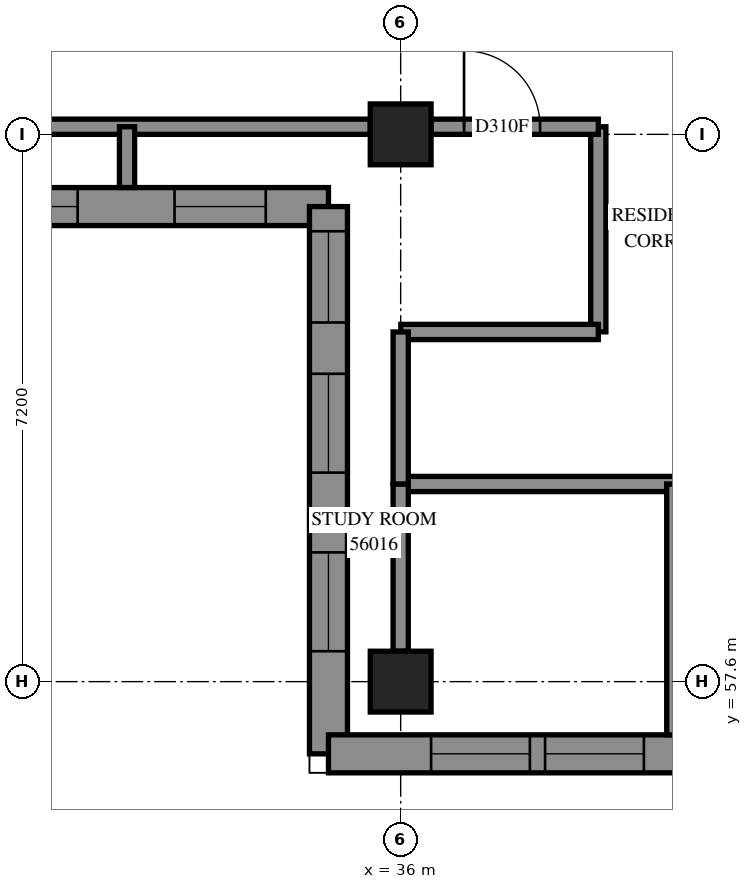
"""IFC4 building model, lengths in metres.
Left out: names, types, materials, properties, quantities, classifications, styles, units other than length and angle.
Written with IfcOpenShell. Run it as: python <this file> out.ifc"""

import sys

from ifc_helpers import new_model, si_unit, direction, frame, frame_2d, origin, origin_2d, place, context, subcontext, project, spatial, polyline, rectangle, outline, extrude, element, fill, save


model = new_model("IFC4")
c1 = context("Model", 3, precision=1e-05, world=origin(), true_north=direction((0.0, 1.0)))
c2 = subcontext(c1, "Body", "Model", "MODEL_VIEW")
j1 = project(units=[si_unit("LENGTHUNIT", "METRE"), si_unit("PLANEANGLEUNIT", "RADIAN")], contexts=[c1])
p1 = place(None, origin())
s1 = spatial("IfcSite", under=j1, at=p1, CompositionType="ELEMENT")
p2 = place(p1, origin())
s2 = spatial("IfcBuilding", under=s1, at=p2, CompositionType="ELEMENT")
p3 = place(p2, frame((0.0, 0.0, 206.6)))
s3 = spatial("IfcBuildingStorey", under=s2, at=p3, CompositionType="ELEMENT", Elevation=206.6)
for number, where, z_axis, x_axis in (
    (1, (36.0, 57.6, 0.0), (0.0, 0.0, 1.0), (1.0, 0.0, 0.0)),
    (2, (36.0, 64.8, 0.0), (0.0, 0.0, 1.0), (1.0, 0.0, 0.0)),
):
    element("IfcColumn", number, at=place(p3, frame(where, z_axis=z_axis, x_axis=x_axis)), inside=s3, PredefinedType="COLUMN", context=c2, shape_type="SweptSolid", body=[
        extrude(rectangle(XDim=0.8, YDim=0.8, at=origin_2d()), origin(), (0.0, 0.0, 1.0), 3.1),
    ])
p4 = place(p3, frame((26.799, 63.85, 0.0), z_axis=(0.0, 0.0, 1.0), x_axis=(1.0, 0.0, 0.0)))
e3 = element("IfcWall", 3, at=p4, inside=s3, PredefinedType="SOLIDWALL", context=c2, shape_type="SweptSolid", body=[
    extrude(outline(polyline([(-0.25, -0.25), (8.001, -0.25), (8.501, 0.25), (0.25, 0.25), (-0.25, -0.25)])), origin(), (0.0, 0.0, 1.0), 3.1),
])
p5 = place(p4, frame((2.151, 0.0, 0.45)))
e4 = element("IfcOpeningElement", 4, at=p5, cuts=e3, PredefinedType="OPENING", context=c2, shape_type="SweptSolid", body=[
    extrude(rectangle(XDim=1.3, YDim=2.5, at=frame_2d((0.65, 1.25))), frame((0.0, 0.26, 0.0), z_axis=(0.0, -1.0, 0.0), x_axis=(1.0, 0.0, 0.0)), (0.0, 0.0, 1.0), 0.52),
])
p6 = place(p4, frame((3.651, 0.0, 0.45)))
e5 = element("IfcOpeningElement", 5, at=p6, cuts=e3, PredefinedType="OPENING", context=c2, shape_type="SweptSolid", body=[
    extrude(rectangle(XDim=1.3, YDim=2.5, at=frame_2d((0.65, 1.25))), frame((0.0, 0.26, 0.0), z_axis=(0.0, -1.0, 0.0), x_axis=(1.0, 0.0, 0.0)), (0.0, 0.0, 1.0), 0.52),
])
p7 = place(p4, frame((0.625, 0.0, 0.45)))
e6 = element("IfcOpeningElement", 6, at=p7, cuts=e3, PredefinedType="OPENING", context=c2, shape_type="SweptSolid", body=[
    extrude(rectangle(XDim=1.2, YDim=2.5, at=frame_2d((0.6, 1.25))), frame((0.0, 0.26, 0.0), z_axis=(0.0, -1.0, 0.0), x_axis=(1.0, 0.0, 0.0)), (0.0, 0.0, 1.0), 0.52),
])
p8 = place(p4, frame((6.226, 0.0, 0.45)))
e7 = element("IfcOpeningElement", 7, at=p8, cuts=e3, PredefinedType="OPENING", context=c2, shape_type="SweptSolid", body=[
    extrude(rectangle(XDim=1.2, YDim=2.5, at=frame_2d((0.6, 1.25))), frame((0.0, 0.26, 0.0), z_axis=(0.0, -1.0, 0.0), x_axis=(1.0, 0.0, 0.0)), (0.0, 0.0, 1.0), 0.52),
])
p9 = place(p3, frame((35.05, 63.85, 0.0), z_axis=(0.0, 0.0, 1.0), x_axis=(0.0, -1.0, 0.0)))
e8 = element("IfcWall", 8, at=p9, inside=s3, PredefinedType="SOLIDWALL", context=c2, shape_type="SweptSolid", body=[
    extrude(outline(polyline([(0.25, -0.25), (7.45, -0.25), (6.95, 0.25), (-0.25, 0.25), (0.25, -0.25)])), origin(), (0.0, 0.0, 1.0), 3.1),
])
p10 = place(p9, frame((2.2, 0.0, 0.45)))
e9 = element("IfcOpeningElement", 9, at=p10, cuts=e8, PredefinedType="OPENING", context=c2, shape_type="SweptSolid", body=[
    extrude(rectangle(XDim=1.3, YDim=2.5, at=frame_2d((0.65, 1.25))), frame((0.0, 0.26, 0.0), z_axis=(0.0, -1.0, 0.0), x_axis=(1.0, 0.0, 0.0)), (0.0, 0.0, 1.0), 0.52),
])
p11 = place(p9, frame((4.55, 0.0, 0.45)))
e10 = element("IfcOpeningElement", 10, at=p11, cuts=e8, PredefinedType="OPENING", context=c2, shape_type="SweptSolid", body=[
    extrude(rectangle(XDim=1.3, YDim=2.5, at=frame_2d((0.65, 1.25))), frame((0.0, 0.26, 0.0), z_axis=(0.0, -1.0, 0.0), x_axis=(1.0, 0.0, 0.0)), (0.0, 0.0, 1.0), 0.52),
])
p12 = place(p9, frame((0.325, 0.0, 0.45)))
e11 = element("IfcOpeningElement", 11, at=p12, cuts=e8, PredefinedType="OPENING", context=c2, shape_type="SweptSolid", body=[
    extrude(rectangle(XDim=1.2, YDim=2.5, at=frame_2d((0.6, 1.25))), frame((0.0, 0.26, 0.0), z_axis=(0.0, -1.0, 0.0), x_axis=(1.0, 0.0, 0.0)), (0.0, 0.0, 1.0), 0.52),
])
p13 = place(p3, frame((35.05, 56.65, 0.0), z_axis=(0.0, 0.0, 1.0), x_axis=(1.0, 0.0, 0.0)))
e12 = element("IfcWall", 12, at=p13, inside=s3, PredefinedType="SOLIDWALL", context=c2, shape_type="SweptSolid", body=[
    extrude(outline(polyline([(-0.25, -0.25), (6.95, -0.25), (7.45, 0.25), (0.25, 0.25), (-0.25, -0.25)])), origin(), (0.0, 0.0, 1.0), 3.1),
])
p14 = place(p13, frame((1.35, 0.0, 0.45)))
e13 = element("IfcOpeningElement", 13, at=p14, cuts=e12, PredefinedType="OPENING", context=c2, shape_type="SweptSolid", body=[
    extrude(rectangle(XDim=1.3, YDim=2.5, at=frame_2d((0.65, 1.25))), frame((0.0, 0.26, 0.0), z_axis=(0.0, -1.0, 0.0), x_axis=(1.0, 0.0, 0.0)), (0.0, 0.0, 1.0), 0.52),
])
p15 = place(p13, frame((2.85, 0.0, 0.45)))
e14 = element("IfcOpeningElement", 14, at=p15, cuts=e12, PredefinedType="OPENING", context=c2, shape_type="SweptSolid", body=[
    extrude(rectangle(XDim=1.3, YDim=2.5, at=frame_2d((0.65, 1.25))), frame((0.0, 0.26, 0.0), z_axis=(0.0, -1.0, 0.0), x_axis=(1.0, 0.0, 0.0)), (0.0, 0.0, 1.0), 0.52),
])
p16 = place(p13, frame((5.175, 0.0, 0.45)))
e15 = element("IfcOpeningElement", 15, at=p16, cuts=e12, PredefinedType="OPENING", context=c2, shape_type="SweptSolid", body=[
    extrude(rectangle(XDim=1.2, YDim=2.5, at=frame_2d((0.6, 1.25))), frame((0.0, 0.26, 0.0), z_axis=(0.0, -1.0, 0.0), x_axis=(1.0, 0.0, 0.0)), (0.0, 0.0, 1.0), 0.52),
])
p17 = place(p3, frame((36.0, 60.2, 0.0), z_axis=(0.0, 0.0, 1.0), x_axis=(1.0, 0.0, 0.0)))
e16 = element("IfcWall", 16, at=p17, inside=s3, PredefinedType="PARTITIONING", context=c2, shape_type="SweptSolid", body=[
    extrude(rectangle(XDim=17.0, YDim=0.2, at=frame_2d((8.5, 0.0))), origin(), (0.0, 0.0, 1.0), 3.1),
])
p18 = place(p17, frame((4.125, 0.0, 0.0)))
e17 = element("IfcOpeningElement", 17, at=p18, cuts=e16, PredefinedType="OPENING", context=c2, shape_type="SweptSolid", body=[
    extrude(rectangle(XDim=1.0, YDim=2.1, at=frame_2d((0.5, 1.05))), frame((0.0, 0.11, 0.0), z_axis=(0.0, -1.0, 0.0), x_axis=(1.0, 0.0, 0.0)), (0.0, 0.0, 1.0), 0.22),
])
p19 = place(p17, frame((7.6, 0.0, 0.0)))
e18 = element("IfcOpeningElement", 18, at=p19, cuts=e16, PredefinedType="OPENING", context=c2, shape_type="SweptSolid", body=[
    extrude(rectangle(XDim=0.9, YDim=2.1, at=frame_2d((0.45, 1.05))), frame((0.0, 0.11, 0.0), z_axis=(0.0, -1.0, 0.0), x_axis=(1.0, 0.0, 0.0)), (0.0, 0.0, 1.0), 0.22),
])
p20 = place(p17, frame((11.48, 0.0, 0.0)))
e19 = element("IfcOpeningElement", 19, at=p20, cuts=e16, PredefinedType="OPENING", context=c2, shape_type="SweptSolid", body=[
    extrude(rectangle(XDim=1.0, YDim=2.1, at=frame_2d((0.5, 1.05))), frame((0.0, 0.11, 0.0), z_axis=(0.0, -1.0, 0.0), x_axis=(1.0, 0.0, 0.0)), (0.0, 0.0, 1.0), 0.22),
])
p21 = place(p17, frame((15.805, 0.0, 0.0)))
e20 = element("IfcOpeningElement", 20, at=p21, cuts=e16, PredefinedType="OPENING", context=c2, shape_type="SweptSolid", body=[
    extrude(rectangle(XDim=1.0, YDim=2.1, at=frame_2d((0.5, 1.05))), frame((0.0, 0.11, 0.0), z_axis=(0.0, -1.0, 0.0), x_axis=(1.0, 0.0, 0.0)), (0.0, 0.0, 1.0), 0.22),
])
p22 = place(p3, frame((29.2, 64.9, 0.0), z_axis=(0.0, 0.0, 1.0), x_axis=(1.0, 0.0, 0.0)))
e21 = element("IfcWall", 21, at=p22, inside=s3, PredefinedType="PARTITIONING", context=c2, shape_type="SweptSolid", body=[
    extrude(rectangle(XDim=6.4, YDim=0.2, at=frame_2d((3.2, 0.0))), origin(), (0.0, 0.0, 1.0), 2.6),
])
p23 = place(p3, frame((39.6, 56.9, 0.0), z_axis=(0.0, 0.0, 1.0), x_axis=(0.0, 1.0, 0.0)))
e22 = element("IfcWall", 22, at=p23, inside=s3, PredefinedType="PARTITIONING", context=c2, shape_type="SweptSolid", body=[
    extrude(rectangle(XDim=3.3, YDim=0.2, at=frame_2d((1.65, 0.0))), origin(), (0.0, 0.0, 1.0), 3.1),
])
p24 = place(p3, frame((38.6, 62.202, 0.0), z_axis=(0.0, 0.0, 1.0), x_axis=(0.0, 1.0, 0.0)))
e23 = element("IfcWall", 23, at=p24, inside=s3, PredefinedType="PARTITIONING", context=c2, shape_type="SweptSolid", body=[
    extrude(rectangle(XDim=2.698, YDim=0.2, at=frame_2d((1.349, 0.0))), origin(), (0.0, 0.0, 1.0), 3.1),
])
p25 = place(p3, frame((36.002, 62.2, 0.0), z_axis=(0.0, 0.0, 1.0), x_axis=(1.0, 0.0, 0.0)))
e24 = element("IfcWall", 24, at=p25, inside=s3, PredefinedType="PARTITIONING", context=c2, shape_type="SweptSolid", body=[
    extrude(rectangle(XDim=2.598, YDim=0.2, at=frame_2d((1.299, 0.0))), origin(), (0.0, 0.0, 1.0), 3.1),
])
p26 = place(p3, frame((36.4, 64.9, 0.0), z_axis=(0.0, 0.0, 1.0), x_axis=(1.0, 0.0, 0.0)))
e25 = element("IfcWall", 25, at=p26, inside=s3, PredefinedType="PARTITIONING", context=c2, shape_type="SweptSolid", body=[
    extrude(rectangle(XDim=2.2, YDim=0.2, at=frame_2d((1.1, 0.0))), origin(), (0.0, 0.0, 1.0), 3.1),
])
p27 = place(p26, frame((0.434, 0.0, 0.0)))
e26 = element("IfcOpeningElement", 26, at=p27, cuts=e25, PredefinedType="OPENING", context=c2, shape_type="SweptSolid", body=[
    extrude(rectangle(XDim=1.0, YDim=2.1, at=frame_2d((0.5, 1.05))), frame((0.0, 0.11, 0.0), z_axis=(0.0, -1.0, 0.0), x_axis=(1.0, 0.0, 0.0)), (0.0, 0.0, 1.0), 0.22),
])
p28 = place(p3, frame((36.0, 58.0, 0.0), z_axis=(0.0, 0.0, 1.0), x_axis=(0.0, 1.0, 0.0)))
e27 = element("IfcWall", 27, at=p28, inside=s3, PredefinedType="PARTITIONING", context=c2, shape_type="SweptSolid", body=[
    extrude(rectangle(XDim=2.2, YDim=0.2, at=frame_2d((1.1, 0.0))), origin(), (0.0, 0.0, 1.0), 2.6),
])
p29 = place(p3, frame((36.0, 60.2, 0.0), z_axis=(0.0, 0.0, 1.0), x_axis=(0.0, 1.0, 0.0)))
e28 = element("IfcWall", 28, at=p29, inside=s3, PredefinedType="PARTITIONING", context=c2, shape_type="SweptSolid", body=[
    extrude(rectangle(XDim=2.0, YDim=0.2, at=frame_2d((1.0, 0.0))), origin(), (0.0, 0.0, 1.0), 2.6),
])
p30 = place(p3, frame((32.4, 64.1, 0.0), z_axis=(0.0, 0.0, 1.0), x_axis=(0.0, 1.0, 0.0)))
e29 = element("IfcWall", 29, at=p30, inside=s3, PredefinedType="PARTITIONING", context=c2, shape_type="SweptSolid", body=[
    extrude(rectangle(XDim=0.8, YDim=0.2, at=frame_2d((0.4, 0.0))), origin(), (0.0, 0.0, 1.0), 3.1),
])
p31 = place(p6, origin())
e30 = element("IfcWindow", 30, at=p31, inside=s3, PartitioningType="SINGLE_PANEL", PredefinedType="WINDOW", context=c2, shape_type="SweptSolid", body=[
    extrude(rectangle(XDim=1.3, YDim=2.5, at=frame_2d((0.65, 1.25))), frame((0.0, 0.18, 0.0), z_axis=(0.0, -1.0, 0.0), x_axis=(1.0, 0.0, 0.0)), (0.0, 0.0, 1.0), 0.06),
])
fill(e5, e30)
p32 = place(p8, origin())
e31 = element("IfcWindow", 31, at=p32, inside=s3, PartitioningType="SINGLE_PANEL", PredefinedType="WINDOW", context=c2, shape_type="SweptSolid", body=[
    extrude(rectangle(XDim=1.2, YDim=2.5, at=frame_2d((0.6, 1.25))), frame((0.0, 0.18, 0.0), z_axis=(0.0, -1.0, 0.0), x_axis=(1.0, 0.0, 0.0)), (0.0, 0.0, 1.0), 0.06),
])
fill(e7, e31)
p33 = place(p10, origin())
e32 = element("IfcWindow", 32, at=p33, inside=s3, PartitioningType="SINGLE_PANEL", PredefinedType="WINDOW", context=c2, shape_type="SweptSolid", body=[
    extrude(rectangle(XDim=1.3, YDim=2.5, at=frame_2d((0.65, 1.25))), frame((0.0, 0.18, 0.0), z_axis=(0.0, -1.0, 0.0), x_axis=(1.0, 0.0, 0.0)), (0.0, 0.0, 1.0), 0.06),
])
fill(e9, e32)
p34 = place(p11, origin())
e33 = element("IfcWindow", 33, at=p34, inside=s3, PartitioningType="SINGLE_PANEL", PredefinedType="WINDOW", context=c2, shape_type="SweptSolid", body=[
    extrude(rectangle(XDim=1.3, YDim=2.5, at=frame_2d((0.65, 1.25))), frame((0.0, 0.18, 0.0), z_axis=(0.0, -1.0, 0.0), x_axis=(1.0, 0.0, 0.0)), (0.0, 0.0, 1.0), 0.06),
])
fill(e10, e33)
p35 = place(p12, origin())
e34 = element("IfcWindow", 34, at=p35, inside=s3, PartitioningType="SINGLE_PANEL", PredefinedType="WINDOW", context=c2, shape_type="SweptSolid", body=[
    extrude(rectangle(XDim=1.2, YDim=2.5, at=frame_2d((0.6, 1.25))), frame((0.0, 0.18, 0.0), z_axis=(0.0, -1.0, 0.0), x_axis=(1.0, 0.0, 0.0)), (0.0, 0.0, 1.0), 0.06),
])
fill(e11, e34)
p36 = place(p14, origin())
e35 = element("IfcWindow", 35, at=p36, inside=s3, PartitioningType="SINGLE_PANEL", PredefinedType="WINDOW", context=c2, shape_type="SweptSolid", body=[
    extrude(rectangle(XDim=1.3, YDim=2.5, at=frame_2d((0.65, 1.25))), frame((0.0, 0.18, 0.0), z_axis=(0.0, -1.0, 0.0), x_axis=(1.0, 0.0, 0.0)), (0.0, 0.0, 1.0), 0.06),
])
fill(e13, e35)
p37 = place(p15, origin())
e36 = element("IfcWindow", 36, at=p37, inside=s3, PartitioningType="SINGLE_PANEL", PredefinedType="WINDOW", context=c2, shape_type="SweptSolid", body=[
    extrude(rectangle(XDim=1.3, YDim=2.5, at=frame_2d((0.65, 1.25))), frame((0.0, 0.18, 0.0), z_axis=(0.0, -1.0, 0.0), x_axis=(1.0, 0.0, 0.0)), (0.0, 0.0, 1.0), 0.06),
])
fill(e14, e36)
p38 = place(p27, origin())
e37 = element("IfcDoor", 37, at=p38, inside=s3, OperationType="SINGLE_SWING_RIGHT", PredefinedType="DOOR", context=c2, shape_type="SweptSolid", body=[
    extrude(rectangle(XDim=1.0, YDim=2.1, at=frame_2d((0.5, 1.05))), frame((0.0, 0.025, 0.0), z_axis=(0.0, -1.0, 0.0), x_axis=(1.0, 0.0, 0.0)), (0.0, 0.0, 1.0), 0.05),
])
fill(e26, e37)
save(model, sys.argv[1])
